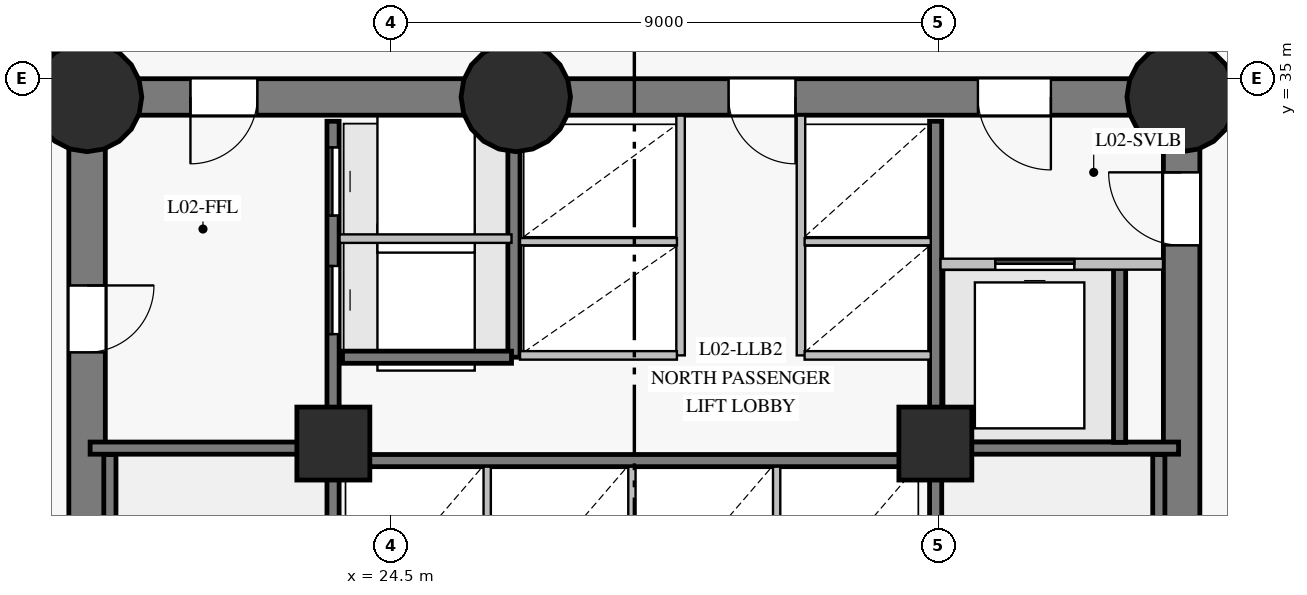
"""IFC4 building model, lengths in metres.
Left out: names, types, materials, properties, quantities, classifications, styles, units other than length and angle.
Written with IfcOpenShell. Run it as: python <this file> out.ifc"""

import sys

from ifc_helpers import new_model, si_unit, direction, frame, frame_2d, origin, origin_with_axes, origin_2d, place, context, subcontext, project, spatial, rectangle, circle, extrude, source, transform, mapped, element, fill, save


model = new_model("IFC4")
c1 = context("Model", 3, precision=1e-05, world=origin(), true_north=direction((0.0, 1.0)))
c2 = subcontext(c1, "Body", "Model", "MODEL_VIEW")
j1 = project(units=[si_unit("LENGTHUNIT", "METRE"), si_unit("PLANEANGLEUNIT", "RADIAN")], contexts=[c1])
p1 = place(None, origin())
s1 = spatial("IfcSite", under=j1, at=p1, CompositionType="ELEMENT")
p2 = place(p1, origin())
s2 = spatial("IfcBuilding", under=s1, at=p2, CompositionType="ELEMENT")
p3 = place(p2, frame((0.0, 0.0, 9.0)))
s3 = spatial("IfcBuildingStorey", under=s2, at=p3, CompositionType="ELEMENT", Elevation=9.0)
p4 = place(p3, frame((37.5, 18.3, 0.0), z_axis=(0.0, 0.0, 1.0), x_axis=(0.0, 1.0, 0.0)))
e1 = element("IfcWall", 1, at=p4, inside=s3, PredefinedType="SHEAR", context=c2, shape_type="SweptSolid", body=[
    extrude(rectangle(XDim=16.4, YDim=0.6, at=frame_2d((8.2, 0.0))), origin(), (0.0, 0.0, 1.0), 4.2),
])
p5 = place(p4, frame((13.96, 0.0, 0.0)))
e2 = element("IfcOpeningElement", 2, at=p5, cuts=e1, PredefinedType="OPENING", context=c2, shape_type="SweptSolid", body=[
    extrude(rectangle(XDim=1.2, YDim=2.15, at=frame_2d((0.6, 1.075))), frame((0.0, 0.31, 0.0), z_axis=(0.0, -1.0, 0.0), x_axis=(1.0, 0.0, 0.0)), (0.0, 0.0, 1.0), 0.62),
])
p6 = place(p3, frame((37.5, 34.7, 0.0), z_axis=(0.0, 0.0, 1.0), x_axis=(-1.0, 0.0, 0.0)))
e3 = element("IfcWall", 3, at=p6, inside=s3, PredefinedType="SHEAR", context=c2, shape_type="SweptSolid", body=[
    extrude(rectangle(XDim=10.95, YDim=0.6, at=frame_2d((5.475, 0.0))), origin(), (0.0, 0.0, 1.0), 4.2),
])
p7 = place(p6, frame((2.15, 0.0, 0.0)))
e4 = element("IfcOpeningElement", 4, at=p7, cuts=e3, PredefinedType="OPENING", context=c2, shape_type="SweptSolid", body=[
    extrude(rectangle(XDim=1.2, YDim=2.15, at=frame_2d((0.6, 1.075))), frame((0.0, 0.31, 0.0), z_axis=(0.0, -1.0, 0.0), x_axis=(1.0, 0.0, 0.0)), (0.0, 0.0, 1.0), 0.62),
])
p8 = place(p6, frame((6.35, 0.0, 0.0)))
e5 = element("IfcOpeningElement", 5, at=p8, cuts=e3, PredefinedType="OPENING", context=c2, shape_type="SweptSolid", body=[
    extrude(rectangle(XDim=1.1, YDim=2.15, at=frame_2d((0.55, 1.075))), frame((0.0, 0.31, 0.0), z_axis=(0.0, -1.0, 0.0), x_axis=(1.0, 0.0, 0.0)), (0.0, 0.0, 1.0), 0.62),
])
p9 = place(p3, frame((26.55, 34.7, 0.0), z_axis=(0.0, 0.0, 1.0), x_axis=(-1.0, 0.0, 0.0)))
e6 = element("IfcWall", 6, at=p9, inside=s3, PredefinedType="SHEAR", context=c2, shape_type="SweptSolid", body=[
    extrude(rectangle(XDim=7.05, YDim=0.6, at=frame_2d((3.525, 0.0))), origin(), (0.0, 0.0, 1.0), 4.2),
])
p10 = place(p9, frame((4.25, 0.0, 0.0)))
e7 = element("IfcOpeningElement", 7, at=p10, cuts=e6, PredefinedType="OPENING", context=c2, shape_type="SweptSolid", body=[
    extrude(rectangle(XDim=1.1, YDim=2.15, at=frame_2d((0.55, 1.075))), frame((0.0, 0.31, 0.0), z_axis=(0.0, -1.0, 0.0), x_axis=(1.0, 0.0, 0.0)), (0.0, 0.0, 1.0), 0.62),
])
p11 = place(p3, frame((19.5, 34.7, 0.0), z_axis=(0.0, 0.0, 1.0), x_axis=(0.0, -1.0, 0.0)))
e8 = element("IfcWall", 8, at=p11, inside=s3, PredefinedType="SHEAR", context=c2, shape_type="SweptSolid", body=[
    extrude(rectangle(XDim=16.4, YDim=0.6, at=frame_2d((8.2, 0.0))), origin(), (0.0, 0.0, 1.0), 4.2),
])
p12 = place(p11, frame((3.1, 0.0, 0.0)))
e9 = element("IfcOpeningElement", 9, at=p12, cuts=e8, PredefinedType="OPENING", context=c2, shape_type="SweptSolid", body=[
    extrude(rectangle(XDim=1.1, YDim=2.15, at=frame_2d((0.55, 1.075))), frame((0.0, 0.31, 0.0), z_axis=(0.0, -1.0, 0.0), x_axis=(1.0, 0.0, 0.0)), (0.0, 0.0, 1.0), 0.62),
])
m1 = source(origin_with_axes(), c2, "Body", "SweptSolid", [
    extrude(circle(Radius=0.9, at=origin_2d()), origin(), (0.0, 0.0, 1.0), 4.5),
])
for number, where, z_axis, x_axis in (
    (10, (19.5, 34.7, 0.0), (0.0, 0.0, 1.0), (1.0, 0.0, 0.0)),
    (11, (26.55, 34.7, 0.0), (0.0, 0.0, 1.0), (1.0, 0.0, 0.0)),
    (12, (37.5, 34.7, 0.0), (0.0, 0.0, 1.0), (1.0, 0.0, 0.0)),
):
    element("IfcColumn", number, at=place(p3, frame(where, z_axis=z_axis, x_axis=x_axis)), inside=s3, PredefinedType="COLUMN", context=c2, shape_type="MappedRepresentation", body=[
        mapped(m1, transform((0.0, 0.0, 0.0), scale=1.0)),
    ])
m2 = source(origin_with_axes(), c2, "Body", "SweptSolid", [
    extrude(rectangle(XDim=1.2, YDim=1.2, at=origin_2d()), origin(), (0.0, 0.0, 1.0), 4.5),
])
for number, where, z_axis, x_axis in (
    (13, (23.55, 29.0, 0.0), (0.0, 0.0, 1.0), (1.0, 0.0, 0.0)),
    (14, (33.45, 29.0, 0.0), (0.0, 0.0, 1.0), (1.0, 0.0, 0.0)),
):
    element("IfcColumn", number, at=place(p3, frame(where, z_axis=z_axis, x_axis=x_axis)), inside=s3, PredefinedType="COLUMN", context=c2, shape_type="MappedRepresentation", body=[
        mapped(m2, transform((0.0, 0.0, 0.0), scale=1.0)),
    ])
p13 = place(p3, frame((23.545, 18.7, 0.0), z_axis=(0.0, 0.0, 1.0), x_axis=(0.0, 1.0, 0.0)))
e15 = element("IfcWall", 15, at=p13, inside=s3, PredefinedType="SHEAR", context=c2, shape_type="SweptSolid", body=[
    extrude(rectangle(XDim=15.6, YDim=0.2, at=frame_2d((7.8, 0.0))), origin(), (0.0, 0.0, 1.0), 4.2),
])
p14 = place(p13, frame((2.75, 0.0, 0.0)))
e16 = element("IfcOpeningElement", 16, at=p14, cuts=e15, PredefinedType="OPENING", context=c2, shape_type="SweptSolid", body=[
    extrude(rectangle(XDim=1.15, YDim=2.15, at=frame_2d((0.575, 1.075))), frame((0.0, 0.11, 0.0), z_axis=(0.0, -1.0, 0.0), x_axis=(1.0, 0.0, 0.0)), (0.0, 0.0, 1.0), 0.22),
])
p15 = place(p13, frame((0.14, 0.0, 0.0)))
e17 = element("IfcOpeningElement", 17, at=p15, cuts=e15, PredefinedType="OPENING", context=c2, shape_type="SweptSolid", body=[
    extrude(rectangle(XDim=0.88, YDim=2.1, at=frame_2d((0.44, 1.05))), frame((0.0, 0.11, 0.0), z_axis=(0.0, -1.0, 0.0), x_axis=(1.0, 0.0, 0.0)), (0.0, 0.0, 1.0), 0.22),
])
p16 = place(p13, frame((1.36, 0.0, 0.0)))
e18 = element("IfcOpeningElement", 18, at=p16, cuts=e15, PredefinedType="OPENING", context=c2, shape_type="SweptSolid", body=[
    extrude(rectangle(XDim=0.88, YDim=2.1, at=frame_2d((0.44, 1.05))), frame((0.0, 0.11, 0.0), z_axis=(0.0, -1.0, 0.0), x_axis=(1.0, 0.0, 0.0)), (0.0, 0.0, 1.0), 0.22),
])
p17 = place(p13, frame((12.1, 0.0, 0.0)))
e19 = element("IfcOpeningElement", 19, at=p17, cuts=e15, PredefinedType="OPENING", context=c2, shape_type="SweptSolid", body=[
    extrude(rectangle(XDim=1.12, YDim=2.15, at=frame_2d((0.56, 1.075))), frame((0.0, 0.11, 0.0), z_axis=(0.0, -1.0, 0.0), x_axis=(1.0, 0.0, 0.0)), (0.0, 0.0, 1.0), 0.22),
])
p18 = place(p13, frame((14.05, 0.0, 0.0)))
e20 = element("IfcOpeningElement", 20, at=p18, cuts=e15, PredefinedType="OPENING", context=c2, shape_type="SweptSolid", body=[
    extrude(rectangle(XDim=1.12, YDim=2.15, at=frame_2d((0.56, 1.075))), frame((0.0, 0.11, 0.0), z_axis=(0.0, -1.0, 0.0), x_axis=(1.0, 0.0, 0.0)), (0.0, 0.0, 1.0), 0.22),
])
p19 = place(p3, frame((33.455, 18.7, 0.0), z_axis=(0.0, 0.0, 1.0), x_axis=(0.0, 1.0, 0.0)))
e21 = element("IfcWall", 21, at=p19, inside=s3, PredefinedType="SHEAR", context=c2, shape_type="SweptSolid", body=[
    extrude(rectangle(XDim=15.6, YDim=0.2, at=frame_2d((7.8, 0.0))), origin(), (0.0, 0.0, 1.0), 4.2),
])
p20 = place(p19, frame((2.75, 0.0, 0.0)))
e22 = element("IfcOpeningElement", 22, at=p20, cuts=e21, PredefinedType="OPENING", context=c2, shape_type="SweptSolid", body=[
    extrude(rectangle(XDim=1.15, YDim=2.15, at=frame_2d((0.575, 1.075))), frame((0.0, 0.11, 0.0), z_axis=(0.0, -1.0, 0.0), x_axis=(1.0, 0.0, 0.0)), (0.0, 0.0, 1.0), 0.22),
])
p21 = place(p19, frame((0.55, 0.0, 0.0)))
e23 = element("IfcOpeningElement", 23, at=p21, cuts=e21, PredefinedType="OPENING", context=c2, shape_type="SweptSolid", body=[
    extrude(rectangle(XDim=0.94, YDim=2.1, at=frame_2d((0.47, 1.05))), frame((0.0, 0.11, 0.0), z_axis=(0.0, -1.0, 0.0), x_axis=(1.0, 0.0, 0.0)), (0.0, 0.0, 1.0), 0.22),
])
p22 = place(p3, frame((23.7, 28.72, 0.0), z_axis=(0.0, 0.0, 1.0), x_axis=(1.0, 0.0, 0.0)))
e24 = element("IfcWall", 24, at=p22, inside=s3, PredefinedType="SHEAR", context=c2, shape_type="SweptSolid", body=[
    extrude(rectangle(XDim=9.6, YDim=0.2, at=frame_2d((4.8, 0.0))), origin(), (0.0, 0.0, 1.0), 4.2),
])
for number, where, z_axis, x_axis in (
    (25, (19.875, 21.32, 0.0), (0.0, 0.0, 1.0), (0.0, 1.0, 0.0)),
    (26, (37.125, 21.32, 0.0), (0.0, 0.0, 1.0), (0.0, 1.0, 0.0)),
):
    element("IfcWall", number, at=place(p3, frame(where, z_axis=z_axis, x_axis=x_axis)), inside=s3, PredefinedType="SHEAR", context=c2, shape_type="SweptSolid", body=[
        extrude(rectangle(XDim=7.5, YDim=0.2, at=frame_2d((3.75, 0.0))), origin(), (0.0, 0.0, 1.0), 4.2),
    ])
for number, where, z_axis, x_axis in (
    (27, (33.455, 28.925, 0.0), (0.0, 0.0, 1.0), (1.0, 0.0, 0.0)),
    (28, (19.55, 28.925, 0.0), (0.0, 0.0, 1.0), (1.0, 0.0, 0.0)),
):
    element("IfcWall", number, at=place(p3, frame(where, z_axis=z_axis, x_axis=x_axis)), inside=s3, PredefinedType="SHEAR", context=c2, shape_type="SweptSolid", body=[
        extrude(rectangle(XDim=3.995, YDim=0.2, at=frame_2d((1.998, 0.0))), origin(), (0.0, 0.0, 1.0), 4.2),
    ])
p23 = place(p3, frame((26.52, 30.42, 0.0), z_axis=(0.0, 0.0, 1.0), x_axis=(0.0, 1.0, 0.0)))
e29 = element("IfcWall", 29, at=p23, inside=s3, PredefinedType="SHEAR", context=c2, shape_type="SweptSolid", body=[
    extrude(rectangle(XDim=3.86, YDim=0.2, at=frame_2d((1.93, 0.0))), origin(), (0.0, 0.0, 1.0), 4.2),
])
p24 = place(p3, frame((36.48, 29.02, 0.0), z_axis=(0.0, 0.0, 1.0), x_axis=(0.0, 1.0, 0.0)))
e30 = element("IfcWall", 30, at=p24, inside=s3, PredefinedType="SHEAR", context=c2, shape_type="SweptSolid", body=[
    extrude(rectangle(XDim=2.86, YDim=0.2, at=frame_2d((1.43, 0.0))), origin(), (0.0, 0.0, 1.0), 4.2),
])
p25 = place(p3, frame((23.7, 30.42, 0.0), z_axis=(0.0, 0.0, 1.0), x_axis=(1.0, 0.0, 0.0)))
e31 = element("IfcWall", 31, at=p25, inside=s3, PredefinedType="SHEAR", context=c2, shape_type="SweptSolid", body=[
    extrude(rectangle(XDim=2.78, YDim=0.2, at=frame_2d((1.39, 0.0))), origin(), (0.0, 0.0, 1.0), 4.2),
])
for number, where, z_axis, x_axis in (
    (32, (29.26, 30.45, 0.0), (0.0, 0.0, 1.0), (0.0, 1.0, 0.0)),
    (33, (31.24, 30.45, 0.0), (0.0, 0.0, 1.0), (0.0, 1.0, 0.0)),
):
    element("IfcWall", number, at=place(p3, frame(where, z_axis=z_axis, x_axis=x_axis)), inside=s3, PredefinedType="PARTITIONING", context=c2, shape_type="SweptSolid", body=[
        extrude(rectangle(XDim=3.943, YDim=0.14, at=frame_2d((1.972, 0.0))), origin(), (0.0, 0.0, 1.0), 4.2),
    ])
p26 = place(p3, frame((33.535, 31.95, 0.0), z_axis=(0.0, 0.0, 1.0), x_axis=(1.0, 0.0, 0.0)))
e34 = element("IfcWall", 34, at=p26, inside=s3, PredefinedType="PARTITIONING", context=c2, shape_type="SweptSolid", body=[
    extrude(rectangle(XDim=3.658, YDim=0.18, at=frame_2d((1.829, 0.0))), origin(), (0.0, 0.0, 1.0), 4.2),
])
p27 = place(p26, frame((0.9, 0.0, 0.0)))
e35 = element("IfcOpeningElement", 35, at=p27, cuts=e34, PredefinedType="OPENING", context=c2, shape_type="SweptSolid", body=[
    extrude(rectangle(XDim=1.3, YDim=2.2, at=frame_2d((0.65, 1.1))), frame((0.0, 0.1, 0.0), z_axis=(0.0, -1.0, 0.0), x_axis=(1.0, 0.0, 0.0)), (0.0, 0.0, 1.0), 0.2),
])
p28 = place(p3, frame((23.652, 32.37, 0.0), z_axis=(0.0, 0.0, 1.0), x_axis=(1.0, 0.0, 0.0)))
e36 = element("IfcWall", 36, at=p28, inside=s3, PredefinedType="PARTITIONING", context=c2, shape_type="SweptSolid", body=[
    extrude(rectangle(XDim=2.828, YDim=0.14, at=frame_2d((1.414, 0.0))), origin(), (0.0, 0.0, 1.0), 4.2),
])
for number, where, z_axis, x_axis in (
    (37, (26.08, 26.02, 0.0), (0.0, 0.0, 1.0), (0.0, 1.0, 0.0)),
    (38, (28.46, 26.02, 0.0), (0.0, 0.0, 1.0), (0.0, 1.0, 0.0)),
    (39, (30.84, 26.02, 0.0), (0.0, 0.0, 1.0), (0.0, 1.0, 0.0)),
):
    element("IfcWall", number, at=place(p3, frame(where, z_axis=z_axis, x_axis=x_axis)), inside=s3, PredefinedType="PARTITIONING", context=c2, shape_type="SweptSolid", body=[
        extrude(rectangle(XDim=2.6, YDim=0.12, at=frame_2d((1.3, 0.0))), origin(), (0.0, 0.0, 1.0), 4.2),
    ])
p29 = place(p3, frame((26.62, 30.45, 0.0), z_axis=(0.0, 0.0, 1.0), x_axis=(1.0, 0.0, 0.0)))
e40 = element("IfcWall", 40, at=p29, inside=s3, PredefinedType="PARTITIONING", context=c2, shape_type="SweptSolid", body=[
    extrude(rectangle(XDim=2.58, YDim=0.14, at=frame_2d((1.29, 0.0))), origin(), (0.0, 0.0, 1.0), 4.2),
])
p30 = place(p3, frame((26.62, 32.32, 0.0), z_axis=(0.0, 0.0, 1.0), x_axis=(1.0, 0.0, 0.0)))
e41 = element("IfcWall", 41, at=p30, inside=s3, PredefinedType="PARTITIONING", context=c2, shape_type="SweptSolid", body=[
    extrude(rectangle(XDim=2.58, YDim=0.12, at=frame_2d((1.29, 0.0))), origin(), (0.0, 0.0, 1.0), 4.2),
])
p31 = place(p3, frame((31.3, 30.45, 0.0), z_axis=(0.0, 0.0, 1.0), x_axis=(1.0, 0.0, 0.0)))
e42 = element("IfcWall", 42, at=p31, inside=s3, PredefinedType="PARTITIONING", context=c2, shape_type="SweptSolid", body=[
    extrude(rectangle(XDim=2.075, YDim=0.14, at=frame_2d((1.038, 0.0))), origin(), (0.0, 0.0, 1.0), 4.2),
])
p32 = place(p3, frame((31.3, 32.32, 0.0), z_axis=(0.0, 0.0, 1.0), x_axis=(1.0, 0.0, 0.0)))
e43 = element("IfcWall", 43, at=p32, inside=s3, PredefinedType="PARTITIONING", context=c2, shape_type="SweptSolid", body=[
    extrude(rectangle(XDim=2.075, YDim=0.12, at=frame_2d((1.038, 0.0))), origin(), (0.0, 0.0, 1.0), 4.2),
])
m3 = source(origin_with_axes(), c2, "Body", "SweptSolid", [
    extrude(rectangle(XDim=1.1, YDim=2.15, at=frame_2d((0.55, 1.075))), frame((0.0, 0.025, 0.0), z_axis=(0.0, -1.0, 0.0), x_axis=(1.0, 0.0, 0.0)), (0.0, 0.0, 1.0), 0.05),
])
p33 = place(p10, origin())
e44 = element("IfcDoor", 44, at=p33, inside=s3, OperationType="SINGLE_SWING_RIGHT", PredefinedType="DOOR", context=c2, shape_type="MappedRepresentation", body=[
    mapped(m3, transform((0.0, 0.0, 0.0), scale=1.0)),
])
fill(e7, e44)
p34 = place(p12, origin())
e45 = element("IfcDoor", 45, at=p34, inside=s3, OperationType="SINGLE_SWING_LEFT", PredefinedType="DOOR", context=c2, shape_type="MappedRepresentation", body=[
    mapped(m3, transform((0.0, 0.0, 0.0), scale=1.0)),
])
fill(e9, e45)
m4 = source(origin_with_axes(), c2, "Body", "SweptSolid", [
    extrude(rectangle(XDim=1.2, YDim=2.15, at=frame_2d((0.6, 1.075))), frame((0.0, 0.025, 0.0), z_axis=(0.0, -1.0, 0.0), x_axis=(1.0, 0.0, 0.0)), (0.0, 0.0, 1.0), 0.05),
])
p35 = place(p5, origin())
e46 = element("IfcDoor", 46, at=p35, inside=s3, OperationType="SINGLE_SWING_RIGHT", PredefinedType="DOOR", context=c2, shape_type="MappedRepresentation", body=[
    mapped(m4, transform((0.0, 0.0, 0.0), scale=1.0)),
])
fill(e2, e46)
p36 = place(p7, origin())
e47 = element("IfcDoor", 47, at=p36, inside=s3, OperationType="SINGLE_SWING_LEFT", PredefinedType="DOOR", context=c2, shape_type="MappedRepresentation", body=[
    mapped(m4, transform((0.0, 0.0, 0.0), scale=1.0)),
])
fill(e4, e47)
m5 = source(origin_with_axes(), c2, "Body", "SweptSolid", [
    extrude(rectangle(XDim=1.3, YDim=2.2, at=frame_2d((0.65, 1.1))), frame((0.0, 0.025, 0.0), z_axis=(0.0, -1.0, 0.0), x_axis=(1.0, 0.0, 0.0)), (0.0, 0.0, 1.0), 0.05),
])
p37 = place(p27, origin())
e48 = element("IfcDoor", 48, at=p37, inside=s3, OperationType="SLIDING_TO_LEFT", PredefinedType="DOOR", context=c2, shape_type="MappedRepresentation", body=[
    mapped(m5, transform((0.0, 0.0, 0.0), scale=1.0)),
])
fill(e35, e48)
p38 = place(p8, origin())
e49 = element("IfcDoor", 49, at=p38, inside=s3, OperationType="SINGLE_SWING_LEFT", PredefinedType="DOOR", context=c2, shape_type="MappedRepresentation", body=[
    mapped(m3, transform((0.0, 0.0, 0.0), scale=1.0)),
])
fill(e5, e49)
m6 = source(origin_with_axes(), c2, "Body", "SweptSolid", [
    extrude(rectangle(XDim=1.12, YDim=2.15, at=frame_2d((0.56, 1.075))), frame((0.0, 0.025, 0.0), z_axis=(0.0, -1.0, 0.0), x_axis=(1.0, 0.0, 0.0)), (0.0, 0.0, 1.0), 0.05),
])
p39 = place(p17, origin())
e50 = element("IfcDoor", 50, at=p39, inside=s3, OperationType="SLIDING_TO_LEFT", PredefinedType="DOOR", context=c2, shape_type="MappedRepresentation", body=[
    mapped(m6, transform((0.0, 0.0, 0.0), scale=1.0)),
])
fill(e19, e50)
p40 = place(p18, origin())
e51 = element("IfcDoor", 51, at=p40, inside=s3, OperationType="SLIDING_TO_RIGHT", PredefinedType="DOOR", context=c2, shape_type="MappedRepresentation", body=[
    mapped(m6, transform((0.0, 0.0, 0.0), scale=1.0)),
])
fill(e20, e51)
save(model, sys.argv[1])
